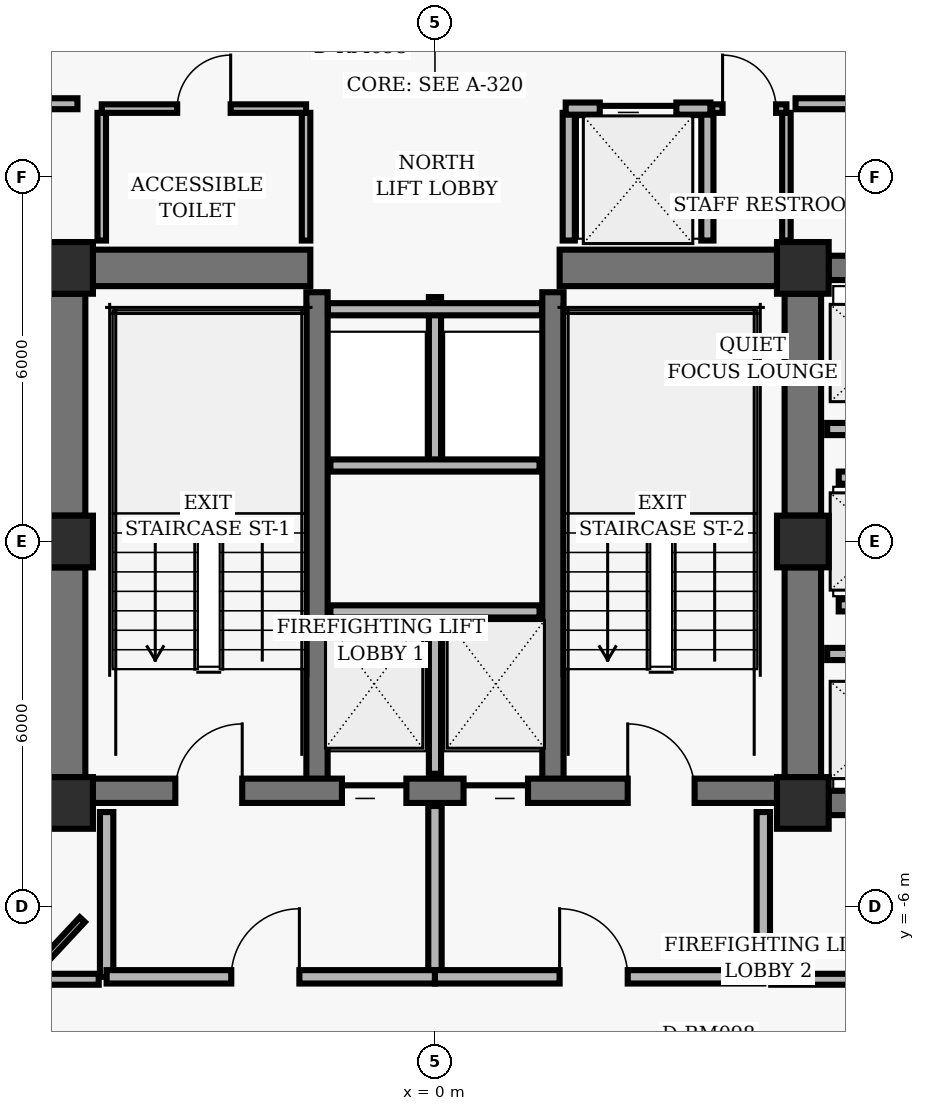
"""IFC4 building model, lengths in metres.
Left out: names, types, materials, properties, quantities, classifications, styles, units other than length and angle.
Written with IfcOpenShell. Run it as: python <this file> out.ifc"""

import sys

from ifc_helpers import new_model, si_unit, direction, frame, frame_2d, origin, origin_2d, place, context, subcontext, project, spatial, rectangle, hollow_rectangle, extrude, element, fill, save


model = new_model("IFC4")
c1 = context("Model", 3, precision=1e-05, world=origin(), true_north=direction((0.0, 1.0)))
c2 = subcontext(c1, "Body", "Model", "MODEL_VIEW")
j1 = project(units=[si_unit("LENGTHUNIT", "METRE"), si_unit("PLANEANGLEUNIT", "RADIAN")], contexts=[c1])
p1 = place(None, origin())
s1 = spatial("IfcSite", under=j1, at=p1, CompositionType="ELEMENT")
p2 = place(p1, origin())
s2 = spatial("IfcBuilding", under=s1, at=p2, CompositionType="ELEMENT")
p3 = place(p2, frame((0.0, 0.0, 141.12)))
s3 = spatial("IfcBuildingStorey", under=s2, at=p3, CompositionType="ELEMENT", Elevation=141.12)
for number, where, z_axis, x_axis in (
    (1, (-6.05, 4.5, 0.0), (0.0, 0.0, 1.0), (1.0, 0.0, 0.0)),
    (2, (6.05, 4.5, 0.0), (0.0, 0.0, 1.0), (1.0, 0.0, 0.0)),
    (3, (-6.05, 0.0, 0.0), (0.0, 0.0, 1.0), (1.0, 0.0, 0.0)),
    (4, (6.05, 0.0, 0.0), (0.0, 0.0, 1.0), (1.0, 0.0, 0.0)),
    (5, (-6.05, -4.3, 0.0), (0.0, 0.0, 1.0), (1.0, 0.0, 0.0)),
    (6, (6.05, -4.3, 0.0), (0.0, 0.0, 1.0), (1.0, 0.0, 0.0)),
):
    element("IfcColumn", number, at=place(p3, frame(where, z_axis=z_axis, x_axis=x_axis)), inside=s3, PredefinedType="COLUMN", context=c2, shape_type="SweptSolid", body=[
        extrude(hollow_rectangle(XDim=0.85, YDim=0.85, WallThickness=0.055, InnerFilletRadius=0.02, OuterFilletRadius=0.04, at=origin_2d()), origin(), (0.0, 0.0, 1.0), 3.04),
    ])
p4 = place(p3, frame((-6.05, 0.425, 0.0), z_axis=(0.0, 0.0, 1.0), x_axis=(0.0, 1.0, 0.0)))
e7 = element("IfcWall", 7, at=p4, inside=s3, PredefinedType="SHEAR", context=c2, shape_type="SweptSolid", body=[
    extrude(rectangle(XDim=3.65, YDim=0.6, at=frame_2d((1.825, 0.0))), origin(), (0.0, 0.0, 1.0), 2.788),
])
p5 = place(p3, frame((-6.05, -3.875, 0.0), z_axis=(0.0, 0.0, 1.0), x_axis=(0.0, 1.0, 0.0)))
e8 = element("IfcWall", 8, at=p5, inside=s3, PredefinedType="SHEAR", context=c2, shape_type="SweptSolid", body=[
    extrude(rectangle(XDim=3.45, YDim=0.6, at=frame_2d((1.725, 0.0))), origin(), (0.0, 0.0, 1.0), 2.788),
])
p6 = place(p3, frame((6.05, 0.425, 0.0), z_axis=(0.0, 0.0, 1.0), x_axis=(0.0, 1.0, 0.0)))
e9 = element("IfcWall", 9, at=p6, inside=s3, PredefinedType="SHEAR", context=c2, shape_type="SweptSolid", body=[
    extrude(rectangle(XDim=3.65, YDim=0.6, at=frame_2d((1.825, 0.0))), origin(), (0.0, 0.0, 1.0), 2.788),
])
p7 = place(p3, frame((6.05, -3.875, 0.0), z_axis=(0.0, 0.0, 1.0), x_axis=(0.0, 1.0, 0.0)))
e10 = element("IfcWall", 10, at=p7, inside=s3, PredefinedType="SHEAR", context=c2, shape_type="SweptSolid", body=[
    extrude(rectangle(XDim=3.45, YDim=0.6, at=frame_2d((1.725, 0.0))), origin(), (0.0, 0.0, 1.0), 2.788),
])
for number, where, z_axis, x_axis in (
    (11, (-1.94, -4.1, 0.0), (0.0, 0.0, 1.0), (0.0, 1.0, 0.0)),
    (12, (1.94, -4.1, 0.0), (0.0, 0.0, 1.0), (0.0, 1.0, 0.0)),
):
    element("IfcWall", number, at=place(p3, frame(where, z_axis=z_axis, x_axis=x_axis)), inside=s3, PredefinedType="SHEAR", context=c2, shape_type="SweptSolid", body=[
        extrude(rectangle(XDim=8.2, YDim=0.35, at=frame_2d((4.1, 0.0))), origin(), (0.0, 0.0, 1.0), 2.788),
    ])
p8 = place(p3, frame((-5.625, -4.1, 0.0), z_axis=(0.0, 0.0, 1.0), x_axis=(1.0, 0.0, 0.0)))
e13 = element("IfcWall", 13, at=p8, inside=s3, PredefinedType="SHEAR", context=c2, shape_type="SweptSolid", body=[
    extrude(rectangle(XDim=11.25, YDim=0.4, at=frame_2d((5.625, 0.0))), origin(), (0.0, 0.0, 1.0), 2.788),
])
p9 = place(p8, frame((1.355, 0.0, 0.0)))
e14 = element("IfcOpeningElement", 14, at=p9, cuts=e13, PredefinedType="OPENING", context=c2, shape_type="SweptSolid", body=[
    extrude(rectangle(XDim=1.1, YDim=2.04, at=frame_2d((0.55, 1.02))), frame((0.0, 0.21, 0.0), z_axis=(0.0, -1.0, 0.0), x_axis=(1.0, 0.0, 0.0)), (0.0, 0.0, 1.0), 0.42),
])
p10 = place(p8, frame((8.795, 0.0, 0.0)))
e15 = element("IfcOpeningElement", 15, at=p10, cuts=e13, PredefinedType="OPENING", context=c2, shape_type="SweptSolid", body=[
    extrude(rectangle(XDim=1.1, YDim=2.04, at=frame_2d((0.55, 1.02))), frame((0.0, 0.21, 0.0), z_axis=(0.0, -1.0, 0.0), x_axis=(1.0, 0.0, 0.0)), (0.0, 0.0, 1.0), 0.42),
])
p11 = place(p8, frame((4.095, 0.0, 0.0)))
e16 = element("IfcOpeningElement", 16, at=p11, cuts=e13, PredefinedType="OPENING", context=c2, shape_type="SweptSolid", body=[
    extrude(rectangle(XDim=1.06, YDim=2.04, at=frame_2d((0.53, 1.02))), frame((0.0, 0.21, 0.0), z_axis=(0.0, -1.0, 0.0), x_axis=(1.0, 0.0, 0.0)), (0.0, 0.0, 1.0), 0.42),
])
p12 = place(p8, frame((6.095, 0.0, 0.0)))
e17 = element("IfcOpeningElement", 17, at=p12, cuts=e13, PredefinedType="OPENING", context=c2, shape_type="SweptSolid", body=[
    extrude(rectangle(XDim=1.06, YDim=2.04, at=frame_2d((0.53, 1.02))), frame((0.0, 0.21, 0.0), z_axis=(0.0, -1.0, 0.0), x_axis=(1.0, 0.0, 0.0)), (0.0, 0.0, 1.0), 0.42),
])
for number, where, z_axis, x_axis in (
    (18, (-5.625, 4.5, 0.0), (0.0, 0.0, 1.0), (1.0, 0.0, 0.0)),
    (19, (2.05, 4.5, 0.0), (0.0, 0.0, 1.0), (1.0, 0.0, 0.0)),
):
    element("IfcWall", number, at=place(p3, frame(where, z_axis=z_axis, x_axis=x_axis)), inside=s3, PredefinedType="SHEAR", context=c2, shape_type="SweptSolid", body=[
        extrude(rectangle(XDim=3.575, YDim=0.6, at=frame_2d((1.788, 0.0))), origin(), (0.0, 0.0, 1.0), 2.788),
    ])
for number, where, z_axis, x_axis in (
    (20, (6.475, 4.5, 0.0), (0.0, 0.0, 1.0), (1.0, 0.0, 0.0)),
    (21, (6.475, -4.3, 0.0), (0.0, 0.0, 1.0), (1.0, 0.0, 0.0)),
):
    element("IfcWall", number, at=place(p3, frame(where, z_axis=z_axis, x_axis=x_axis)), inside=s3, PredefinedType="SHEAR", context=c2, shape_type="SweptSolid", body=[
        extrude(rectangle(XDim=2.05, YDim=0.4, at=frame_2d((1.025, 0.0))), origin(), (0.0, 0.0, 1.0), 2.788),
    ])
p13 = place(p3, frame((0.0, -3.82, 0.0), z_axis=(0.0, 0.0, 1.0), x_axis=(0.0, 1.0, 0.0)))
e22 = element("IfcWall", 22, at=p13, inside=s3, PredefinedType="PARTITIONING", context=c2, shape_type="SweptSolid", body=[
    extrude(rectangle(XDim=2.67, YDim=0.2, at=frame_2d((1.335, 0.0))), origin(), (0.0, 0.0, 1.0), 2.763),
])
p14 = place(p3, frame((-1.72, -1.15, 0.0), z_axis=(0.0, 0.0, 1.0), x_axis=(1.0, 0.0, 0.0)))
e23 = element("IfcWall", 23, at=p14, inside=s3, PredefinedType="PARTITIONING", context=c2, shape_type="SweptSolid", body=[
    extrude(rectangle(XDim=3.44, YDim=0.2, at=frame_2d((1.72, 0.0))), origin(), (0.0, 0.0, 1.0), 2.763),
])
for number, where, z_axis, x_axis in (
    (24, (-5.4, -7.16, 0.0), (0.0, 0.0, 1.0), (0.0, 1.0, 0.0)),
    (25, (5.4, -7.16, 0.0), (0.0, 0.0, 1.0), (0.0, 1.0, 0.0)),
):
    element("IfcWall", number, at=place(p3, frame(where, z_axis=z_axis, x_axis=x_axis)), inside=s3, PredefinedType="PARTITIONING", context=c2, shape_type="SweptSolid", body=[
        extrude(rectangle(XDim=2.71, YDim=0.22, at=frame_2d((1.355, 0.0))), origin(), (0.0, 0.0, 1.0), 2.763),
    ])
p15 = place(p3, frame((0.0, -7.16, 0.0), z_axis=(0.0, 0.0, 1.0), x_axis=(0.0, 1.0, 0.0)))
e26 = element("IfcWall", 26, at=p15, inside=s3, PredefinedType="PARTITIONING", context=c2, shape_type="SweptSolid", body=[
    extrude(rectangle(XDim=2.81, YDim=0.22, at=frame_2d((1.405, 0.0))), origin(), (0.0, 0.0, 1.0), 2.763),
])
p16 = place(p3, frame((-5.4, -7.16, 0.0), z_axis=(0.0, 0.0, 1.0), x_axis=(1.0, 0.0, 0.0)))
e27 = element("IfcWall", 27, at=p16, inside=s3, PredefinedType="PARTITIONING", context=c2, shape_type="SweptSolid", body=[
    extrude(rectangle(XDim=5.4, YDim=0.22, at=frame_2d((2.7, 0.0))), origin(), (0.0, 0.0, 1.0), 2.33),
])
p17 = place(p16, frame((2.05, 0.0, 0.0)))
e28 = element("IfcOpeningElement", 28, at=p17, cuts=e27, PredefinedType="OPENING", context=c2, shape_type="SweptSolid", body=[
    extrude(rectangle(XDim=1.12, YDim=2.02, at=frame_2d((0.56, 1.01))), frame((0.0, 0.12, 0.0), z_axis=(0.0, -1.0, 0.0), x_axis=(1.0, 0.0, 0.0)), (0.0, 0.0, 1.0), 0.24),
])
p18 = place(p3, frame((0.0, -7.16, 0.0), z_axis=(0.0, 0.0, 1.0), x_axis=(1.0, 0.0, 0.0)))
e29 = element("IfcWall", 29, at=p18, inside=s3, PredefinedType="PARTITIONING", context=c2, shape_type="SweptSolid", body=[
    extrude(rectangle(XDim=5.4, YDim=0.22, at=frame_2d((2.7, 0.0))), origin(), (0.0, 0.0, 1.0), 2.33),
])
p19 = place(p18, frame((2.05, 0.0, 0.0)))
e30 = element("IfcOpeningElement", 30, at=p19, cuts=e29, PredefinedType="OPENING", context=c2, shape_type="SweptSolid", body=[
    extrude(rectangle(XDim=1.12, YDim=2.02, at=frame_2d((0.56, 1.01))), frame((0.0, 0.12, 0.0), z_axis=(0.0, -1.0, 0.0), x_axis=(1.0, 0.0, 0.0)), (0.0, 0.0, 1.0), 0.24),
])
p20 = place(p3, frame((0.0, 1.25, 0.0), z_axis=(0.0, 0.0, 1.0), x_axis=(0.0, 1.0, 0.0)))
e31 = element("IfcWall", 31, at=p20, inside=s3, PredefinedType="PARTITIONING", context=c2, shape_type="SweptSolid", body=[
    extrude(rectangle(XDim=2.77, YDim=0.2, at=frame_2d((1.385, 0.0))), origin(), (0.0, 0.0, 1.0), 2.763),
])
p21 = place(p3, frame((-1.72, 1.25, 0.0), z_axis=(0.0, 0.0, 1.0), x_axis=(1.0, 0.0, 0.0)))
e32 = element("IfcWall", 32, at=p21, inside=s3, PredefinedType="PARTITIONING", context=c2, shape_type="SweptSolid", body=[
    extrude(rectangle(XDim=3.44, YDim=0.2, at=frame_2d((1.72, 0.0))), origin(), (0.0, 0.0, 1.0), 2.763),
])
p22 = place(p3, frame((-1.76, 3.82, 0.0), z_axis=(0.0, 0.0, 1.0), x_axis=(1.0, 0.0, 0.0)))
e33 = element("IfcWall", 33, at=p22, inside=s3, PredefinedType="PARTITIONING", context=c2, shape_type="SweptSolid", body=[
    extrude(rectangle(XDim=3.52, YDim=0.2, at=frame_2d((1.76, 0.0))), origin(), (0.0, 0.0, 1.0), 2.763),
])
for number, where, z_axis, x_axis in (
    (34, (2.2, 4.95, 0.0), (0.0, 0.0, 1.0), (0.0, 1.0, 0.0)),
    (35, (4.48, 4.95, 0.0), (0.0, 0.0, 1.0), (0.0, 1.0, 0.0)),
):
    element("IfcWall", number, at=place(p3, frame(where, z_axis=z_axis, x_axis=x_axis)), inside=s3, PredefinedType="PARTITIONING", context=c2, shape_type="SweptSolid", body=[
        extrude(rectangle(XDim=2.1, YDim=0.2, at=frame_2d((1.05, 0.0))), origin(), (0.0, 0.0, 1.0), 2.763),
    ])
p23 = place(p3, frame((2.15, 7.12, 0.0), z_axis=(0.0, 0.0, 1.0), x_axis=(1.0, 0.0, 0.0)))
e36 = element("IfcWall", 36, at=p23, inside=s3, PredefinedType="PARTITIONING", context=c2, shape_type="SweptSolid", body=[
    extrude(rectangle(XDim=2.38, YDim=0.2, at=frame_2d((1.19, 0.0))), origin(), (0.0, 0.0, 1.0), 2.763),
])
p24 = place(p23, frame((0.56, 0.0, 0.0)))
e37 = element("IfcOpeningElement", 37, at=p24, cuts=e36, PredefinedType="OPENING", context=c2, shape_type="SweptSolid", body=[
    extrude(rectangle(XDim=1.26, YDim=2.06, at=frame_2d((0.63, 1.03))), frame((0.0, 0.11, 0.0), z_axis=(0.0, -1.0, 0.0), x_axis=(1.0, 0.0, 0.0)), (0.0, 0.0, 1.0), 0.22),
])
for number, where, z_axis, x_axis in (
    (38, (-5.48, 4.95, 0.0), (0.0, 0.0, 1.0), (0.0, 1.0, 0.0)),
    (39, (-2.12, 4.95, 0.0), (0.0, 0.0, 1.0), (0.0, 1.0, 0.0)),
):
    element("IfcWall", number, at=place(p3, frame(where, z_axis=z_axis, x_axis=x_axis)), inside=s3, PredefinedType="PARTITIONING", context=c2, shape_type="SweptSolid", body=[
        extrude(rectangle(XDim=2.1, YDim=0.14, at=frame_2d((1.05, 0.0))), origin(), (0.0, 0.0, 1.0), 2.763),
    ])
p25 = place(p3, frame((-5.48, 7.12, 0.0), z_axis=(0.0, 0.0, 1.0), x_axis=(1.0, 0.0, 0.0)))
e40 = element("IfcWall", 40, at=p25, inside=s3, PredefinedType="PARTITIONING", context=c2, shape_type="SweptSolid", body=[
    extrude(rectangle(XDim=3.36, YDim=0.14, at=frame_2d((1.68, 0.0))), origin(), (0.0, 0.0, 1.0), 2.33),
])
p26 = place(p25, frame((1.24, 0.0, 0.0)))
e41 = element("IfcOpeningElement", 41, at=p26, cuts=e40, PredefinedType="OPENING", context=c2, shape_type="SweptSolid", body=[
    extrude(rectangle(XDim=0.88, YDim=2.02, at=frame_2d((0.44, 1.01))), frame((0.0, 0.08, 0.0), z_axis=(0.0, -1.0, 0.0), x_axis=(1.0, 0.0, 0.0)), (0.0, 0.0, 1.0), 0.16),
])
p27 = place(p3, frame((5.78, 4.95, 0.0), z_axis=(0.0, 0.0, 1.0), x_axis=(0.0, 1.0, 0.0)))
e42 = element("IfcWall", 42, at=p27, inside=s3, PredefinedType="PARTITIONING", context=c2, shape_type="SweptSolid", body=[
    extrude(rectangle(XDim=2.1, YDim=0.14, at=frame_2d((1.05, 0.0))), origin(), (0.0, 0.0, 1.0), 2.763),
])
p28 = place(p3, frame((4.56, 7.12, 0.0), z_axis=(0.0, 0.0, 1.0), x_axis=(1.0, 0.0, 0.0)))
e43 = element("IfcWall", 43, at=p28, inside=s3, PredefinedType="PARTITIONING", context=c2, shape_type="SweptSolid", body=[
    extrude(rectangle(XDim=1.22, YDim=0.14, at=frame_2d((0.61, 0.0))), origin(), (0.0, 0.0, 1.0), 2.763),
])
p29 = place(p28, frame((0.17, 0.0, 0.0)))
e44 = element("IfcOpeningElement", 44, at=p29, cuts=e43, PredefinedType="OPENING", context=c2, shape_type="SweptSolid", body=[
    extrude(rectangle(XDim=0.88, YDim=2.02, at=frame_2d((0.44, 1.01))), frame((0.0, 0.08, 0.0), z_axis=(0.0, -1.0, 0.0), x_axis=(1.0, 0.0, 0.0)), (0.0, 0.0, 1.0), 0.16),
])
for number, where, z_axis, x_axis in (
    (45, (6.45, -1.85, 0.0), (0.0, 0.0, 1.0), (1.0, 0.0, 0.0)),
    (46, (6.45, 1.85, 0.0), (0.0, 0.0, 1.0), (1.0, 0.0, 0.0)),
):
    element("IfcWall", number, at=place(p3, frame(where, z_axis=z_axis, x_axis=x_axis)), inside=s3, PredefinedType="PARTITIONING", context=c2, shape_type="SweptSolid", body=[
        extrude(rectangle(XDim=2.1, YDim=0.2, at=frame_2d((1.05, 0.0))), origin(), (0.0, 0.0, 1.0), 2.763),
    ])
for number, where, z_axis, x_axis in (
    (47, (6.64, -1.05, 0.0), (0.0, 0.0, 1.0), (1.0, 0.0, 0.0)),
    (48, (6.64, 1.05, 0.0), (0.0, 0.0, 1.0), (1.0, 0.0, 0.0)),
):
    element("IfcWall", number, at=place(p3, frame(where, z_axis=z_axis, x_axis=x_axis)), inside=s3, PredefinedType="PARTITIONING", context=c2, shape_type="SweptSolid", body=[
        extrude(rectangle(XDim=1.91, YDim=0.2, at=frame_2d((0.955, 0.0))), origin(), (0.0, 0.0, 1.0), 2.763),
    ])
p30 = place(p3, frame((5.53, -7.2, 0.0), z_axis=(0.0, 0.0, 1.0), x_axis=(1.0, 0.0, 0.0)))
e49 = element("IfcWall", 49, at=p30, inside=s3, PredefinedType="PARTITIONING", context=c2, shape_type="SweptSolid", body=[
    extrude(rectangle(XDim=5.52, YDim=0.18, at=frame_2d((2.76, 0.0))), origin(), (0.0, 0.0, 1.0), 2.33),
])
p31 = place(p30, frame((2.28, 0.0, 0.0)))
e50 = element("IfcOpeningElement", 50, at=p31, cuts=e49, PredefinedType="OPENING", context=c2, shape_type="SweptSolid", body=[
    extrude(rectangle(XDim=0.96, YDim=2.02, at=frame_2d((0.48, 1.01))), frame((0.0, 0.1, 0.0), z_axis=(0.0, -1.0, 0.0), x_axis=(1.0, 0.0, 0.0)), (0.0, 0.0, 1.0), 0.2),
])
p32 = place(p3, frame((11.05, 7.2, 0.0), z_axis=(0.0, 0.0, 1.0), x_axis=(-1.0, 0.0, 0.0)))
e51 = element("IfcWall", 51, at=p32, inside=s3, PredefinedType="PARTITIONING", context=c2, shape_type="SweptSolid", body=[
    extrude(rectangle(XDim=5.12, YDim=0.18, at=frame_2d((2.56, 0.0))), origin(), (0.0, 0.0, 1.0), 2.763),
])
p33 = place(p32, frame((2.08, 0.0, 0.0)))
e52 = element("IfcOpeningElement", 52, at=p33, cuts=e51, PredefinedType="OPENING", context=c2, shape_type="SweptSolid", body=[
    extrude(rectangle(XDim=0.96, YDim=2.02, at=frame_2d((0.48, 1.01))), frame((0.0, 0.1, 0.0), z_axis=(0.0, -1.0, 0.0), x_axis=(1.0, 0.0, 0.0)), (0.0, 0.0, 1.0), 0.2),
])
p34 = place(p3, frame((-5.88, 7.2, 0.0), z_axis=(0.0, 0.0, 1.0), x_axis=(-1.0, 0.0, 0.0)))
e53 = element("IfcWall", 53, at=p34, inside=s3, PredefinedType="PARTITIONING", context=c2, shape_type="SweptSolid", body=[
    extrude(rectangle(XDim=0.71, YDim=0.18, at=frame_2d((0.355, 0.0))), origin(), (0.0, 0.0, 1.0), 2.33),
])
p35 = place(p3, frame((-6.59, -7.2, 0.0), z_axis=(0.0, 0.0, 1.0), x_axis=(1.0, 0.0, 0.0)))
e54 = element("IfcWall", 54, at=p35, inside=s3, PredefinedType="PARTITIONING", context=c2, shape_type="SweptSolid", body=[
    extrude(rectangle(XDim=1.06, YDim=0.18, at=frame_2d((0.53, 0.0))), origin(), (0.0, 0.0, 1.0), 2.33),
])
p36 = place(p3, frame((-5.8, -6.22, 0.0), z_axis=(0.0, 0.0, 1.0), x_axis=(-0.681964083565, -0.731385663469, 0.0)))
e55 = element("IfcWall", 55, at=p36, inside=s3, PredefinedType="MOVABLE", context=c2, shape_type="SweptSolid", body=[
    extrude(rectangle(XDim=0.909, YDim=0.115, at=frame_2d((0.455, 0.0))), origin(), (0.0, 0.0, 1.0), 2.763),
])
p37 = place(p9, origin())
e56 = element("IfcDoor", 56, at=p37, inside=s3, OperationType="SINGLE_SWING_RIGHT", PredefinedType="DOOR", context=c2, shape_type="SweptSolid", body=[
    extrude(rectangle(XDim=1.1, YDim=2.04, at=frame_2d((0.55, 1.02))), frame((0.0, 0.025, 0.0), z_axis=(0.0, -1.0, 0.0), x_axis=(1.0, 0.0, 0.0)), (0.0, 0.0, 1.0), 0.05),
])
fill(e14, e56)
p38 = place(p10, origin())
e57 = element("IfcDoor", 57, at=p38, inside=s3, OperationType="SINGLE_SWING_LEFT", PredefinedType="DOOR", context=c2, shape_type="SweptSolid", body=[
    extrude(rectangle(XDim=1.1, YDim=2.04, at=frame_2d((0.55, 1.02))), frame((0.0, 0.025, 0.0), z_axis=(0.0, -1.0, 0.0), x_axis=(1.0, 0.0, 0.0)), (0.0, 0.0, 1.0), 0.05),
])
fill(e15, e57)
p39 = place(p11, origin())
e58 = element("IfcDoor", 58, at=p39, inside=s3, OperationType="SLIDING_TO_LEFT", PredefinedType="DOOR", context=c2, shape_type="SweptSolid", body=[
    extrude(rectangle(XDim=1.06, YDim=2.04, at=frame_2d((0.53, 1.02))), frame((0.0, 0.025, 0.0), z_axis=(0.0, -1.0, 0.0), x_axis=(1.0, 0.0, 0.0)), (0.0, 0.0, 1.0), 0.05),
])
fill(e16, e58)
p40 = place(p12, origin())
e59 = element("IfcDoor", 59, at=p40, inside=s3, OperationType="SLIDING_TO_RIGHT", PredefinedType="DOOR", context=c2, shape_type="SweptSolid", body=[
    extrude(rectangle(XDim=1.06, YDim=2.04, at=frame_2d((0.53, 1.02))), frame((0.0, 0.025, 0.0), z_axis=(0.0, -1.0, 0.0), x_axis=(1.0, 0.0, 0.0)), (0.0, 0.0, 1.0), 0.05),
])
fill(e17, e59)
p41 = place(p17, origin())
e60 = element("IfcDoor", 60, at=p41, inside=s3, OperationType="SINGLE_SWING_RIGHT", PredefinedType="DOOR", context=c2, shape_type="SweptSolid", body=[
    extrude(rectangle(XDim=1.12, YDim=2.02, at=frame_2d((0.56, 1.01))), frame((0.0, 0.025, 0.0), z_axis=(0.0, -1.0, 0.0), x_axis=(1.0, 0.0, 0.0)), (0.0, 0.0, 1.0), 0.05),
])
fill(e28, e60)
p42 = place(p19, origin())
e61 = element("IfcDoor", 61, at=p42, inside=s3, OperationType="SINGLE_SWING_LEFT", PredefinedType="DOOR", context=c2, shape_type="SweptSolid", body=[
    extrude(rectangle(XDim=1.12, YDim=2.02, at=frame_2d((0.56, 1.01))), frame((0.0, 0.025, 0.0), z_axis=(0.0, -1.0, 0.0), x_axis=(1.0, 0.0, 0.0)), (0.0, 0.0, 1.0), 0.05),
])
fill(e30, e61)
p43 = place(p24, origin())
e62 = element("IfcDoor", 62, at=p43, inside=s3, OperationType="SLIDING_TO_LEFT", PredefinedType="DOOR", context=c2, shape_type="SweptSolid", body=[
    extrude(rectangle(XDim=1.26, YDim=2.06, at=frame_2d((0.63, 1.03))), frame((0.0, 0.025, 0.0), z_axis=(0.0, -1.0, 0.0), x_axis=(1.0, 0.0, 0.0)), (0.0, 0.0, 1.0), 0.05),
])
fill(e37, e62)
p44 = place(p26, origin())
e63 = element("IfcDoor", 63, at=p44, inside=s3, OperationType="SINGLE_SWING_RIGHT", PredefinedType="DOOR", context=c2, shape_type="SweptSolid", body=[
    extrude(rectangle(XDim=0.88, YDim=2.02, at=frame_2d((0.44, 1.01))), frame((0.0, 0.025, 0.0), z_axis=(0.0, -1.0, 0.0), x_axis=(1.0, 0.0, 0.0)), (0.0, 0.0, 1.0), 0.05),
])
fill(e41, e63)
p45 = place(p29, origin())
e64 = element("IfcDoor", 64, at=p45, inside=s3, OperationType="SINGLE_SWING_LEFT", PredefinedType="DOOR", context=c2, shape_type="SweptSolid", body=[
    extrude(rectangle(XDim=0.88, YDim=2.02, at=frame_2d((0.44, 1.01))), frame((0.0, 0.025, 0.0), z_axis=(0.0, -1.0, 0.0), x_axis=(1.0, 0.0, 0.0)), (0.0, 0.0, 1.0), 0.05),
])
fill(e44, e64)
save(model, sys.argv[1])
